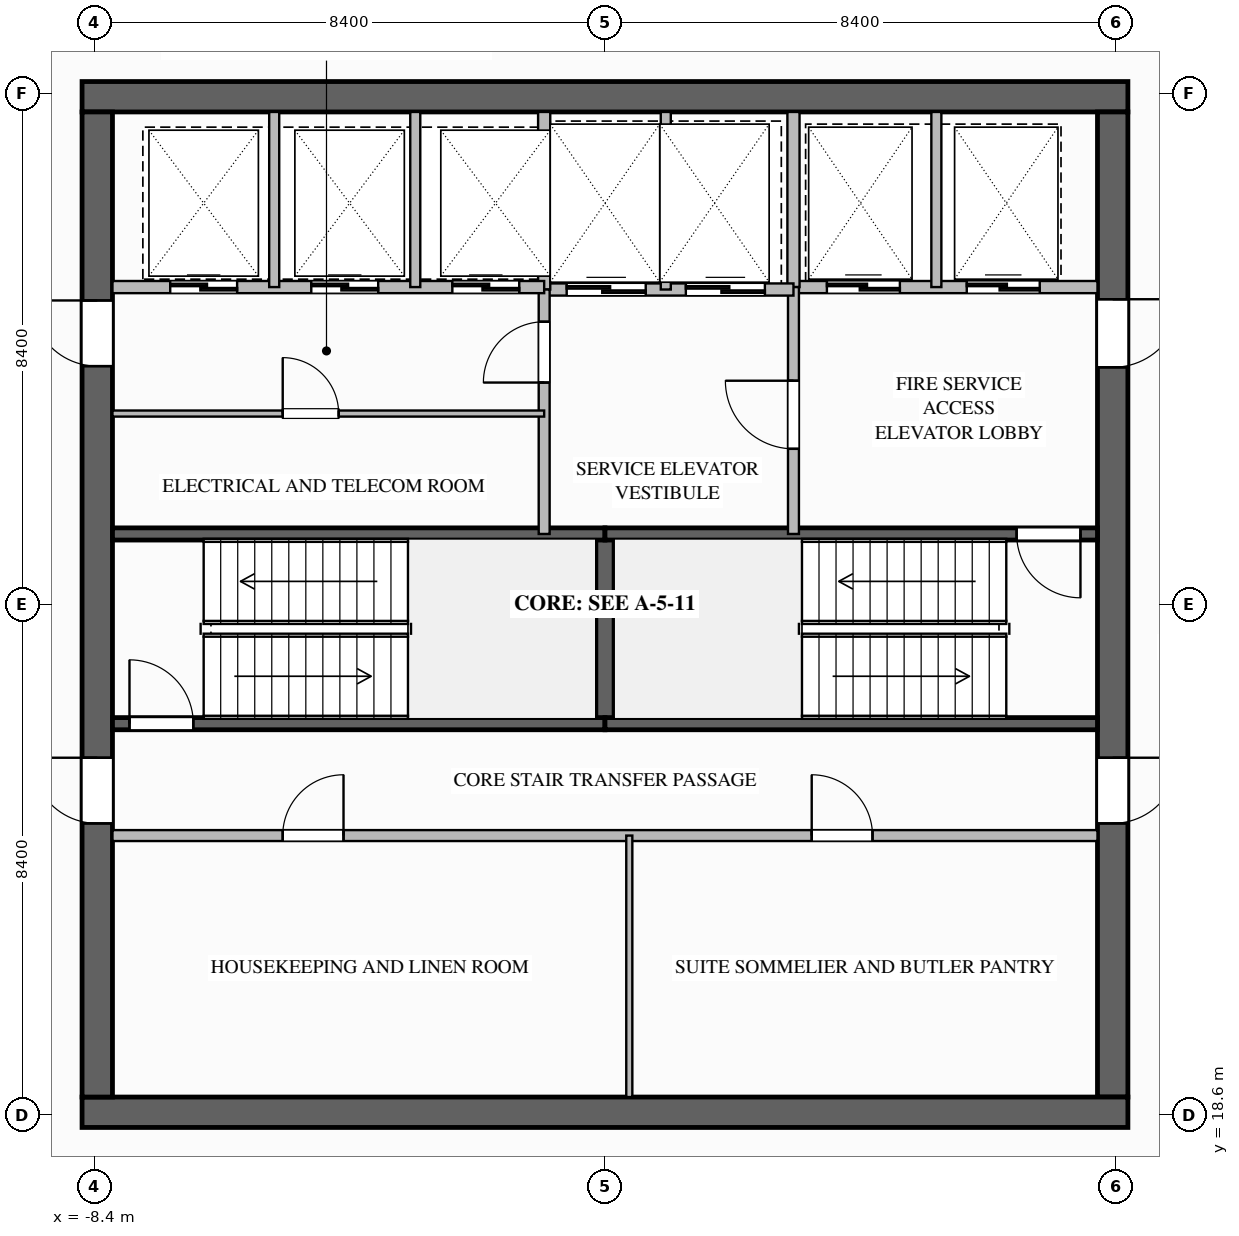
"""IFC4 building model, lengths in metres.
Left out: names, types, materials, properties, quantities, classifications, styles, units other than length and angle.
Written with IfcOpenShell. Run it as: python <this file> out.ifc"""

import sys

from ifc_helpers import new_model, si_unit, direction, frame, frame_2d, origin, place, context, subcontext, project, spatial, rectangle, extrude, element, fill, save


model = new_model("IFC4")
c1 = context("Model", 3, precision=1e-05, world=origin(), true_north=direction((0.0, 1.0)))
c2 = subcontext(c1, "Body", "Model", "MODEL_VIEW")
j1 = project(units=[si_unit("LENGTHUNIT", "METRE"), si_unit("PLANEANGLEUNIT", "RADIAN")], contexts=[c1])
p1 = place(None, origin())
s1 = spatial("IfcSite", under=j1, at=p1, CompositionType="ELEMENT")
p2 = place(p1, origin())
s2 = spatial("IfcBuilding", under=s1, at=p2, CompositionType="ELEMENT")
p3 = place(p2, frame((0.0, 0.0, 298.6)))
s3 = spatial("IfcBuildingStorey", under=s2, at=p3, CompositionType="ELEMENT", Elevation=298.6)
p4 = place(p3, frame((-8.6, 35.35, 0.0), z_axis=(0.0, 0.0, 1.0), x_axis=(1.0, 0.0, 0.0)))
e1 = element("IfcWall", 1, at=p4, inside=s3, PredefinedType="SHEAR", context=c2, shape_type="SweptSolid", body=[
    extrude(rectangle(XDim=17.2, YDim=0.5, at=frame_2d((8.6, 0.0))), origin(), (0.0, 0.0, 1.0), 4.4),
])
p5 = place(p3, frame((8.35, 35.1, 0.0), z_axis=(0.0, 0.0, 1.0), x_axis=(0.0, -1.0, 0.0)))
e2 = element("IfcWall", 2, at=p5, inside=s3, PredefinedType="SHEAR", context=c2, shape_type="SweptSolid", body=[
    extrude(rectangle(XDim=16.2, YDim=0.5, at=frame_2d((8.1, 0.0))), origin(), (0.0, 0.0, 1.0), 4.4),
])
p6 = place(p5, frame((3.08, 0.0, 0.0)))
e3 = element("IfcOpeningElement", 3, at=p6, cuts=e2, PredefinedType="OPENING", context=c2, shape_type="SweptSolid", body=[
    extrude(rectangle(XDim=1.12, YDim=2.1, at=frame_2d((0.56, 1.05))), frame((0.0, 0.26, 0.0), z_axis=(0.0, -1.0, 0.0), x_axis=(1.0, 0.0, 0.0)), (0.0, 0.0, 1.0), 0.52),
])
p7 = place(p5, frame((10.62, 0.0, 0.0)))
e4 = element("IfcOpeningElement", 4, at=p7, cuts=e2, PredefinedType="OPENING", context=c2, shape_type="SweptSolid", body=[
    extrude(rectangle(XDim=1.08, YDim=2.04, at=frame_2d((0.54, 1.02))), frame((0.0, 0.26, 0.0), z_axis=(0.0, -1.0, 0.0), x_axis=(1.0, 0.0, 0.0)), (0.0, 0.0, 1.0), 0.52),
])
p8 = place(p3, frame((8.6, 18.65, 0.0), z_axis=(0.0, 0.0, 1.0), x_axis=(-1.0, 0.0, 0.0)))
e5 = element("IfcWall", 5, at=p8, inside=s3, PredefinedType="SHEAR", context=c2, shape_type="SweptSolid", body=[
    extrude(rectangle(XDim=17.2, YDim=0.5, at=frame_2d((8.6, 0.0))), origin(), (0.0, 0.0, 1.0), 4.4),
])
p9 = place(p3, frame((-8.35, 18.9, 0.0), z_axis=(0.0, 0.0, 1.0), x_axis=(0.0, 1.0, 0.0)))
e6 = element("IfcWall", 6, at=p9, inside=s3, PredefinedType="SHEAR", context=c2, shape_type="SweptSolid", body=[
    extrude(rectangle(XDim=16.2, YDim=0.5, at=frame_2d((8.1, 0.0))), origin(), (0.0, 0.0, 1.0), 4.4),
])
p10 = place(p9, frame((12.02, 0.0, 0.0)))
e7 = element("IfcOpeningElement", 7, at=p10, cuts=e6, PredefinedType="OPENING", context=c2, shape_type="SweptSolid", body=[
    extrude(rectangle(XDim=1.08, YDim=2.04, at=frame_2d((0.54, 1.02))), frame((0.0, 0.26, 0.0), z_axis=(0.0, -1.0, 0.0), x_axis=(1.0, 0.0, 0.0)), (0.0, 0.0, 1.0), 0.52),
])
p11 = place(p9, frame((4.5, 0.0, 0.0)))
e8 = element("IfcOpeningElement", 8, at=p11, cuts=e6, PredefinedType="OPENING", context=c2, shape_type="SweptSolid", body=[
    extrude(rectangle(XDim=1.08, YDim=2.04, at=frame_2d((0.54, 1.02))), frame((0.0, 0.26, 0.0), z_axis=(0.0, -1.0, 0.0), x_axis=(1.0, 0.0, 0.0)), (0.0, 0.0, 1.0), 0.52),
])
p12 = place(p3, frame((0.0, 25.04, 0.0), z_axis=(0.0, 0.0, 1.0), x_axis=(0.0, 1.0, 0.0)))
e9 = element("IfcWall", 9, at=p12, inside=s3, PredefinedType="SOLIDWALL", context=c2, shape_type="SweptSolid", body=[
    extrude(rectangle(XDim=3.12, YDim=0.3, at=frame_2d((1.56, 0.0))), origin(), (0.0, 0.0, 1.0), 4.05),
])
p13 = place(p3, frame((-8.1, 25.04, 0.0), z_axis=(0.0, 0.0, 1.0), x_axis=(1.0, 0.0, 0.0)))
e10 = element("IfcWall", 10, at=p13, inside=s3, PredefinedType="SOLIDWALL", context=c2, shape_type="SweptSolid", body=[
    extrude(rectangle(XDim=8.1, YDim=0.2, at=frame_2d((4.05, 0.0))), origin(), (0.0, 0.0, 1.0), 4.05),
])
p14 = place(p13, frame((0.28, 0.0, 0.0)))
e11 = element("IfcOpeningElement", 11, at=p14, cuts=e10, PredefinedType="OPENING", context=c2, shape_type="SweptSolid", body=[
    extrude(rectangle(XDim=1.05, YDim=2.1, at=frame_2d((0.525, 1.05))), frame((0.0, 0.11, 0.0), z_axis=(0.0, -1.0, 0.0), x_axis=(1.0, 0.0, 0.0)), (0.0, 0.0, 1.0), 0.22),
])
for number, where, z_axis, x_axis in (
    (12, (-8.1, 28.16, 0.0), (0.0, 0.0, 1.0), (1.0, 0.0, 0.0)),
    (13, (0.0, 25.04, 0.0), (0.0, 0.0, 1.0), (1.0, 0.0, 0.0)),
):
    element("IfcWall", number, at=place(p3, frame(where, z_axis=z_axis, x_axis=x_axis)), inside=s3, PredefinedType="SOLIDWALL", context=c2, shape_type="SweptSolid", body=[
        extrude(rectangle(XDim=8.1, YDim=0.2, at=frame_2d((4.05, 0.0))), origin(), (0.0, 0.0, 1.0), 4.05),
    ])
p15 = place(p3, frame((8.1, 28.16, 0.0), z_axis=(0.0, 0.0, 1.0), x_axis=(-1.0, 0.0, 0.0)))
e14 = element("IfcWall", 14, at=p15, inside=s3, PredefinedType="SOLIDWALL", context=c2, shape_type="SweptSolid", body=[
    extrude(rectangle(XDim=8.1, YDim=0.2, at=frame_2d((4.05, 0.0))), origin(), (0.0, 0.0, 1.0), 4.05),
])
p16 = place(p15, frame((0.28, 0.0, 0.0)))
e15 = element("IfcOpeningElement", 15, at=p16, cuts=e14, PredefinedType="OPENING", context=c2, shape_type="SweptSolid", body=[
    extrude(rectangle(XDim=1.05, YDim=2.1, at=frame_2d((0.525, 1.05))), frame((0.0, 0.11, 0.0), z_axis=(0.0, -1.0, 0.0), x_axis=(1.0, 0.0, 0.0)), (0.0, 0.0, 1.0), 0.22),
])
p17 = place(p3, frame((3.1, 32.22, 0.0), z_axis=(0.0, 0.0, 1.0), x_axis=(1.0, 0.0, 0.0)))
e16 = element("IfcWall", 16, at=p17, inside=s3, PredefinedType="SOLIDWALL", context=c2, shape_type="SweptSolid", body=[
    extrude(rectangle(XDim=5.0, YDim=0.2, at=frame_2d((2.5, 0.0))), origin(), (0.0, 0.0, 1.0), 4.05),
])
p18 = place(p17, frame((0.55, 0.0, 0.0)))
e17 = element("IfcOpeningElement", 17, at=p18, cuts=e16, PredefinedType="OPENING", context=c2, shape_type="SweptSolid", body=[
    extrude(rectangle(XDim=1.2, YDim=2.2, at=frame_2d((0.6, 1.1))), frame((0.0, 0.11, 0.0), z_axis=(0.0, -1.0, 0.0), x_axis=(1.0, 0.0, 0.0)), (0.0, 0.0, 1.0), 0.22),
])
p19 = place(p17, frame((2.85, 0.0, 0.0)))
e18 = element("IfcOpeningElement", 18, at=p19, cuts=e16, PredefinedType="OPENING", context=c2, shape_type="SweptSolid", body=[
    extrude(rectangle(XDim=1.2, YDim=2.2, at=frame_2d((0.6, 1.1))), frame((0.0, 0.11, 0.0), z_axis=(0.0, -1.0, 0.0), x_axis=(1.0, 0.0, 0.0)), (0.0, 0.0, 1.0), 0.22),
])
p20 = place(p3, frame((3.1, 32.22, 0.0), z_axis=(0.0, 0.0, 1.0), x_axis=(0.0, 1.0, 0.0)))
e19 = element("IfcWall", 19, at=p20, inside=s3, PredefinedType="SOLIDWALL", context=c2, shape_type="SweptSolid", body=[
    extrude(rectangle(XDim=2.88, YDim=0.2, at=frame_2d((1.44, 0.0))), origin(), (0.0, 0.0, 1.0), 4.05),
])
p21 = place(p3, frame((5.45, 32.22, 0.0), z_axis=(0.0, 0.0, 1.0), x_axis=(0.0, 1.0, 0.0)))
e20 = element("IfcWall", 20, at=p21, inside=s3, PredefinedType="PARTITIONING", context=c2, shape_type="SweptSolid", body=[
    extrude(rectangle(XDim=2.88, YDim=0.165, at=frame_2d((1.44, 0.0))), origin(), (0.0, 0.0, 1.0), 4.05),
])
p22 = place(p3, frame((3.1, 28.16, 0.0), z_axis=(0.0, 0.0, 1.0), x_axis=(0.0, 1.0, 0.0)))
e21 = element("IfcWall", 21, at=p22, inside=s3, PredefinedType="SOLIDWALL", context=c2, shape_type="SweptSolid", body=[
    extrude(rectangle(XDim=4.06, YDim=0.18, at=frame_2d((2.03, 0.0))), origin(), (0.0, 0.0, 1.0), 4.05),
])
p23 = place(p22, frame((1.4, 0.0, 0.0)))
e22 = element("IfcOpeningElement", 22, at=p23, cuts=e21, PredefinedType="OPENING", context=c2, shape_type="SweptSolid", body=[
    extrude(rectangle(XDim=1.12, YDim=2.1, at=frame_2d((0.56, 1.05))), frame((0.0, 0.1, 0.0), z_axis=(0.0, -1.0, 0.0), x_axis=(1.0, 0.0, 0.0)), (0.0, 0.0, 1.0), 0.2),
])
p24 = place(p3, frame((-1.0, 32.18, 0.0), z_axis=(0.0, 0.0, 1.0), x_axis=(1.0, 0.0, 0.0)))
e23 = element("IfcWall", 23, at=p24, inside=s3, PredefinedType="SOLIDWALL", context=c2, shape_type="SweptSolid", body=[
    extrude(rectangle(XDim=4.1, YDim=0.2, at=frame_2d((2.05, 0.0))), origin(), (0.0, 0.0, 1.0), 4.05),
])
p25 = place(p24, frame((0.37, 0.0, 0.0)))
e24 = element("IfcOpeningElement", 24, at=p25, cuts=e23, PredefinedType="OPENING", context=c2, shape_type="SweptSolid", body=[
    extrude(rectangle(XDim=1.3, YDim=2.2, at=frame_2d((0.65, 1.1))), frame((0.0, 0.11, 0.0), z_axis=(0.0, -1.0, 0.0), x_axis=(1.0, 0.0, 0.0)), (0.0, 0.0, 1.0), 0.22),
])
p26 = place(p24, frame((2.33, 0.0, 0.0)))
e25 = element("IfcOpeningElement", 25, at=p26, cuts=e23, PredefinedType="OPENING", context=c2, shape_type="SweptSolid", body=[
    extrude(rectangle(XDim=1.3, YDim=2.2, at=frame_2d((0.65, 1.1))), frame((0.0, 0.11, 0.0), z_axis=(0.0, -1.0, 0.0), x_axis=(1.0, 0.0, 0.0)), (0.0, 0.0, 1.0), 0.22),
])
p27 = place(p3, frame((-1.0, 32.18, 0.0), z_axis=(0.0, 0.0, 1.0), x_axis=(0.0, 1.0, 0.0)))
e26 = element("IfcWall", 26, at=p27, inside=s3, PredefinedType="SOLIDWALL", context=c2, shape_type="SweptSolid", body=[
    extrude(rectangle(XDim=2.92, YDim=0.2, at=frame_2d((1.46, 0.0))), origin(), (0.0, 0.0, 1.0), 4.05),
])
p28 = place(p3, frame((1.0, 32.18, 0.0), z_axis=(0.0, 0.0, 1.0), x_axis=(0.0, 1.0, 0.0)))
e27 = element("IfcWall", 27, at=p28, inside=s3, PredefinedType="PARTITIONING", context=c2, shape_type="SweptSolid", body=[
    extrude(rectangle(XDim=2.92, YDim=0.165, at=frame_2d((1.46, 0.0))), origin(), (0.0, 0.0, 1.0), 4.05),
])
p29 = place(p3, frame((-1.0, 28.16, 0.0), z_axis=(0.0, 0.0, 1.0), x_axis=(0.0, 1.0, 0.0)))
e28 = element("IfcWall", 28, at=p29, inside=s3, PredefinedType="SOLIDWALL", context=c2, shape_type="SweptSolid", body=[
    extrude(rectangle(XDim=4.02, YDim=0.18, at=frame_2d((2.01, 0.0))), origin(), (0.0, 0.0, 1.0), 4.05),
])
p30 = place(p29, frame((2.49, 0.0, 0.0)))
e29 = element("IfcOpeningElement", 29, at=p30, cuts=e28, PredefinedType="OPENING", context=c2, shape_type="SweptSolid", body=[
    extrude(rectangle(XDim=1.0, YDim=2.1, at=frame_2d((0.5, 1.05))), frame((0.0, 0.1, 0.0), z_axis=(0.0, -1.0, 0.0), x_axis=(1.0, 0.0, 0.0)), (0.0, 0.0, 1.0), 0.2),
])
p31 = place(p3, frame((-8.1, 32.22, 0.0), z_axis=(0.0, 0.0, 1.0), x_axis=(1.0, 0.0, 0.0)))
e30 = element("IfcWall", 30, at=p31, inside=s3, PredefinedType="SOLIDWALL", context=c2, shape_type="SweptSolid", body=[
    extrude(rectangle(XDim=7.1, YDim=0.2, at=frame_2d((3.55, 0.0))), origin(), (0.0, 0.0, 1.0), 4.05),
])
p32 = place(p31, frame((0.95, 0.0, 0.0)))
e31 = element("IfcOpeningElement", 31, at=p32, cuts=e30, PredefinedType="OPENING", context=c2, shape_type="SweptSolid", body=[
    extrude(rectangle(XDim=1.1, YDim=2.2, at=frame_2d((0.55, 1.1))), frame((0.0, 0.11, 0.0), z_axis=(0.0, -1.0, 0.0), x_axis=(1.0, 0.0, 0.0)), (0.0, 0.0, 1.0), 0.22),
])
p33 = place(p31, frame((3.27, 0.0, 0.0)))
e32 = element("IfcOpeningElement", 32, at=p33, cuts=e30, PredefinedType="OPENING", context=c2, shape_type="SweptSolid", body=[
    extrude(rectangle(XDim=1.1, YDim=2.2, at=frame_2d((0.55, 1.1))), frame((0.0, 0.11, 0.0), z_axis=(0.0, -1.0, 0.0), x_axis=(1.0, 0.0, 0.0)), (0.0, 0.0, 1.0), 0.22),
])
p34 = place(p31, frame((5.59, 0.0, 0.0)))
e33 = element("IfcOpeningElement", 33, at=p34, cuts=e30, PredefinedType="OPENING", context=c2, shape_type="SweptSolid", body=[
    extrude(rectangle(XDim=1.1, YDim=2.2, at=frame_2d((0.55, 1.1))), frame((0.0, 0.11, 0.0), z_axis=(0.0, -1.0, 0.0), x_axis=(1.0, 0.0, 0.0)), (0.0, 0.0, 1.0), 0.22),
])
for number, where, z_axis, x_axis in (
    (34, (-5.44, 32.22, 0.0), (0.0, 0.0, 1.0), (0.0, 1.0, 0.0)),
    (35, (-3.12, 32.22, 0.0), (0.0, 0.0, 1.0), (0.0, 1.0, 0.0)),
):
    element("IfcWall", number, at=place(p3, frame(where, z_axis=z_axis, x_axis=x_axis)), inside=s3, PredefinedType="PARTITIONING", context=c2, shape_type="SweptSolid", body=[
        extrude(rectangle(XDim=2.88, YDim=0.165, at=frame_2d((1.44, 0.0))), origin(), (0.0, 0.0, 1.0), 4.05),
    ])
p35 = place(p3, frame((-8.1, 30.14, 0.0), z_axis=(0.0, 0.0, 1.0), x_axis=(1.0, 0.0, 0.0)))
e36 = element("IfcWall", 36, at=p35, inside=s3, PredefinedType="PARTITIONING", context=c2, shape_type="SweptSolid", body=[
    extrude(rectangle(XDim=7.1, YDim=0.1, at=frame_2d((3.55, 0.0))), origin(), (0.0, 0.0, 1.0), 4.05),
])
p36 = place(p35, frame((2.8, 0.0, 0.0)))
e37 = element("IfcOpeningElement", 37, at=p36, cuts=e36, PredefinedType="OPENING", context=c2, shape_type="SweptSolid", body=[
    extrude(rectangle(XDim=0.92, YDim=2.1, at=frame_2d((0.46, 1.05))), frame((0.0, 0.06, 0.0), z_axis=(0.0, -1.0, 0.0), x_axis=(1.0, 0.0, 0.0)), (0.0, 0.0, 1.0), 0.12),
])
p37 = place(p3, frame((-8.1, 23.2, 0.0), z_axis=(0.0, 0.0, 1.0), x_axis=(1.0, 0.0, 0.0)))
e38 = element("IfcWall", 38, at=p37, inside=s3, PredefinedType="SOLIDWALL", context=c2, shape_type="SweptSolid", body=[
    extrude(rectangle(XDim=16.2, YDim=0.18, at=frame_2d((8.1, 0.0))), origin(), (0.0, 0.0, 1.0), 4.05),
])
p38 = place(p37, frame((2.8, 0.0, 0.0)))
e39 = element("IfcOpeningElement", 39, at=p38, cuts=e38, PredefinedType="OPENING", context=c2, shape_type="SweptSolid", body=[
    extrude(rectangle(XDim=1.0, YDim=2.1, at=frame_2d((0.5, 1.05))), frame((0.0, 0.1, 0.0), z_axis=(0.0, -1.0, 0.0), x_axis=(1.0, 0.0, 0.0)), (0.0, 0.0, 1.0), 0.2),
])
p39 = place(p37, frame((11.5, 0.0, 0.0)))
e40 = element("IfcOpeningElement", 40, at=p39, cuts=e38, PredefinedType="OPENING", context=c2, shape_type="SweptSolid", body=[
    extrude(rectangle(XDim=1.0, YDim=2.1, at=frame_2d((0.5, 1.05))), frame((0.0, 0.1, 0.0), z_axis=(0.0, -1.0, 0.0), x_axis=(1.0, 0.0, 0.0)), (0.0, 0.0, 1.0), 0.2),
])
p40 = place(p3, frame((0.4, 18.9, 0.0), z_axis=(0.0, 0.0, 1.0), x_axis=(0.0, 1.0, 0.0)))
e41 = element("IfcWall", 41, at=p40, inside=s3, PredefinedType="PARTITIONING", context=c2, shape_type="SweptSolid", body=[
    extrude(rectangle(XDim=4.3, YDim=0.1, at=frame_2d((2.15, 0.0))), origin(), (0.0, 0.0, 1.0), 4.05),
])
p41 = place(p14, origin())
e42 = element("IfcDoor", 42, at=p41, inside=s3, OperationType="SINGLE_SWING_LEFT", PredefinedType="DOOR", context=c2, shape_type="SweptSolid", body=[
    extrude(rectangle(XDim=1.05, YDim=2.1, at=frame_2d((0.525, 1.05))), frame((0.0, 0.025, 0.0), z_axis=(0.0, -1.0, 0.0), x_axis=(1.0, 0.0, 0.0)), (0.0, 0.0, 1.0), 0.05),
])
fill(e11, e42)
p42 = place(p16, origin())
e43 = element("IfcDoor", 43, at=p42, inside=s3, OperationType="SINGLE_SWING_LEFT", PredefinedType="DOOR", context=c2, shape_type="SweptSolid", body=[
    extrude(rectangle(XDim=1.05, YDim=2.1, at=frame_2d((0.525, 1.05))), frame((0.0, 0.025, 0.0), z_axis=(0.0, -1.0, 0.0), x_axis=(1.0, 0.0, 0.0)), (0.0, 0.0, 1.0), 0.05),
])
fill(e15, e43)
p43 = place(p18, origin())
e44 = element("IfcDoor", 44, at=p43, inside=s3, OperationType="SLIDING_TO_LEFT", PredefinedType="DOOR", context=c2, shape_type="SweptSolid", body=[
    extrude(rectangle(XDim=1.2, YDim=2.2, at=frame_2d((0.6, 1.1))), frame((0.0, 0.025, 0.0), z_axis=(0.0, -1.0, 0.0), x_axis=(1.0, 0.0, 0.0)), (0.0, 0.0, 1.0), 0.05),
])
fill(e17, e44)
p44 = place(p19, origin())
e45 = element("IfcDoor", 45, at=p44, inside=s3, OperationType="SLIDING_TO_LEFT", PredefinedType="DOOR", context=c2, shape_type="SweptSolid", body=[
    extrude(rectangle(XDim=1.2, YDim=2.2, at=frame_2d((0.6, 1.1))), frame((0.0, 0.025, 0.0), z_axis=(0.0, -1.0, 0.0), x_axis=(1.0, 0.0, 0.0)), (0.0, 0.0, 1.0), 0.05),
])
fill(e18, e45)
p45 = place(p23, origin())
e46 = element("IfcDoor", 46, at=p45, inside=s3, OperationType="SINGLE_SWING_RIGHT", PredefinedType="DOOR", context=c2, shape_type="SweptSolid", body=[
    extrude(rectangle(XDim=1.12, YDim=2.1, at=frame_2d((0.56, 1.05))), frame((0.0, 0.025, 0.0), z_axis=(0.0, -1.0, 0.0), x_axis=(1.0, 0.0, 0.0)), (0.0, 0.0, 1.0), 0.05),
])
fill(e22, e46)
p46 = place(p6, origin())
e47 = element("IfcDoor", 47, at=p46, inside=s3, OperationType="SINGLE_SWING_LEFT", PredefinedType="DOOR", context=c2, shape_type="SweptSolid", body=[
    extrude(rectangle(XDim=1.12, YDim=2.1, at=frame_2d((0.56, 1.05))), frame((0.0, 0.025, 0.0), z_axis=(0.0, -1.0, 0.0), x_axis=(1.0, 0.0, 0.0)), (0.0, 0.0, 1.0), 0.05),
])
fill(e3, e47)
p47 = place(p25, origin())
e48 = element("IfcDoor", 48, at=p47, inside=s3, OperationType="SLIDING_TO_LEFT", PredefinedType="DOOR", context=c2, shape_type="SweptSolid", body=[
    extrude(rectangle(XDim=1.3, YDim=2.2, at=frame_2d((0.65, 1.1))), frame((0.0, 0.025, 0.0), z_axis=(0.0, -1.0, 0.0), x_axis=(1.0, 0.0, 0.0)), (0.0, 0.0, 1.0), 0.05),
])
fill(e24, e48)
p48 = place(p26, origin())
e49 = element("IfcDoor", 49, at=p48, inside=s3, OperationType="SLIDING_TO_LEFT", PredefinedType="DOOR", context=c2, shape_type="SweptSolid", body=[
    extrude(rectangle(XDim=1.3, YDim=2.2, at=frame_2d((0.65, 1.1))), frame((0.0, 0.025, 0.0), z_axis=(0.0, -1.0, 0.0), x_axis=(1.0, 0.0, 0.0)), (0.0, 0.0, 1.0), 0.05),
])
fill(e25, e49)
p49 = place(p30, origin())
e50 = element("IfcDoor", 50, at=p49, inside=s3, OperationType="SINGLE_SWING_LEFT", PredefinedType="DOOR", context=c2, shape_type="SweptSolid", body=[
    extrude(rectangle(XDim=1.0, YDim=2.1, at=frame_2d((0.5, 1.05))), frame((0.0, 0.025, 0.0), z_axis=(0.0, -1.0, 0.0), x_axis=(1.0, 0.0, 0.0)), (0.0, 0.0, 1.0), 0.05),
])
fill(e29, e50)
p50 = place(p32, origin())
e51 = element("IfcDoor", 51, at=p50, inside=s3, OperationType="SLIDING_TO_LEFT", PredefinedType="DOOR", context=c2, shape_type="SweptSolid", body=[
    extrude(rectangle(XDim=1.1, YDim=2.2, at=frame_2d((0.55, 1.1))), frame((0.0, 0.025, 0.0), z_axis=(0.0, -1.0, 0.0), x_axis=(1.0, 0.0, 0.0)), (0.0, 0.0, 1.0), 0.05),
])
fill(e31, e51)
p51 = place(p33, origin())
e52 = element("IfcDoor", 52, at=p51, inside=s3, OperationType="SLIDING_TO_LEFT", PredefinedType="DOOR", context=c2, shape_type="SweptSolid", body=[
    extrude(rectangle(XDim=1.1, YDim=2.2, at=frame_2d((0.55, 1.1))), frame((0.0, 0.025, 0.0), z_axis=(0.0, -1.0, 0.0), x_axis=(1.0, 0.0, 0.0)), (0.0, 0.0, 1.0), 0.05),
])
fill(e32, e52)
p52 = place(p34, origin())
e53 = element("IfcDoor", 53, at=p52, inside=s3, OperationType="SLIDING_TO_LEFT", PredefinedType="DOOR", context=c2, shape_type="SweptSolid", body=[
    extrude(rectangle(XDim=1.1, YDim=2.2, at=frame_2d((0.55, 1.1))), frame((0.0, 0.025, 0.0), z_axis=(0.0, -1.0, 0.0), x_axis=(1.0, 0.0, 0.0)), (0.0, 0.0, 1.0), 0.05),
])
fill(e33, e53)
p53 = place(p10, origin())
e54 = element("IfcDoor", 54, at=p53, inside=s3, OperationType="SINGLE_SWING_RIGHT", PredefinedType="DOOR", context=c2, shape_type="SweptSolid", body=[
    extrude(rectangle(XDim=1.08, YDim=2.04, at=frame_2d((0.54, 1.02))), frame((0.0, 0.025, 0.0), z_axis=(0.0, -1.0, 0.0), x_axis=(1.0, 0.0, 0.0)), (0.0, 0.0, 1.0), 0.05),
])
fill(e7, e54)
p54 = place(p36, origin())
e55 = element("IfcDoor", 55, at=p54, inside=s3, OperationType="SINGLE_SWING_LEFT", PredefinedType="DOOR", context=c2, shape_type="SweptSolid", body=[
    extrude(rectangle(XDim=0.92, YDim=2.1, at=frame_2d((0.46, 1.05))), frame((0.0, 0.025, 0.0), z_axis=(0.0, -1.0, 0.0), x_axis=(1.0, 0.0, 0.0)), (0.0, 0.0, 1.0), 0.05),
])
fill(e37, e55)
p55 = place(p11, origin())
e56 = element("IfcDoor", 56, at=p55, inside=s3, OperationType="SINGLE_SWING_RIGHT", PredefinedType="DOOR", context=c2, shape_type="SweptSolid", body=[
    extrude(rectangle(XDim=1.08, YDim=2.04, at=frame_2d((0.54, 1.02))), frame((0.0, 0.025, 0.0), z_axis=(0.0, -1.0, 0.0), x_axis=(1.0, 0.0, 0.0)), (0.0, 0.0, 1.0), 0.05),
])
fill(e8, e56)
p56 = place(p7, origin())
e57 = element("IfcDoor", 57, at=p56, inside=s3, OperationType="SINGLE_SWING_LEFT", PredefinedType="DOOR", context=c2, shape_type="SweptSolid", body=[
    extrude(rectangle(XDim=1.08, YDim=2.04, at=frame_2d((0.54, 1.02))), frame((0.0, 0.025, 0.0), z_axis=(0.0, -1.0, 0.0), x_axis=(1.0, 0.0, 0.0)), (0.0, 0.0, 1.0), 0.05),
])
fill(e4, e57)
p57 = place(p38, origin())
e58 = element("IfcDoor", 58, at=p57, inside=s3, OperationType="SINGLE_SWING_RIGHT", PredefinedType="DOOR", context=c2, shape_type="SweptSolid", body=[
    extrude(rectangle(XDim=1.0, YDim=2.1, at=frame_2d((0.5, 1.05))), frame((0.0, 0.025, 0.0), z_axis=(0.0, -1.0, 0.0), x_axis=(1.0, 0.0, 0.0)), (0.0, 0.0, 1.0), 0.05),
])
fill(e39, e58)
p58 = place(p39, origin())
e59 = element("IfcDoor", 59, at=p58, inside=s3, OperationType="SINGLE_SWING_LEFT", PredefinedType="DOOR", context=c2, shape_type="SweptSolid", body=[
    extrude(rectangle(XDim=1.0, YDim=2.1, at=frame_2d((0.5, 1.05))), frame((0.0, 0.025, 0.0), z_axis=(0.0, -1.0, 0.0), x_axis=(1.0, 0.0, 0.0)), (0.0, 0.0, 1.0), 0.05),
])
fill(e40, e59)
save(model, sys.argv[1])
